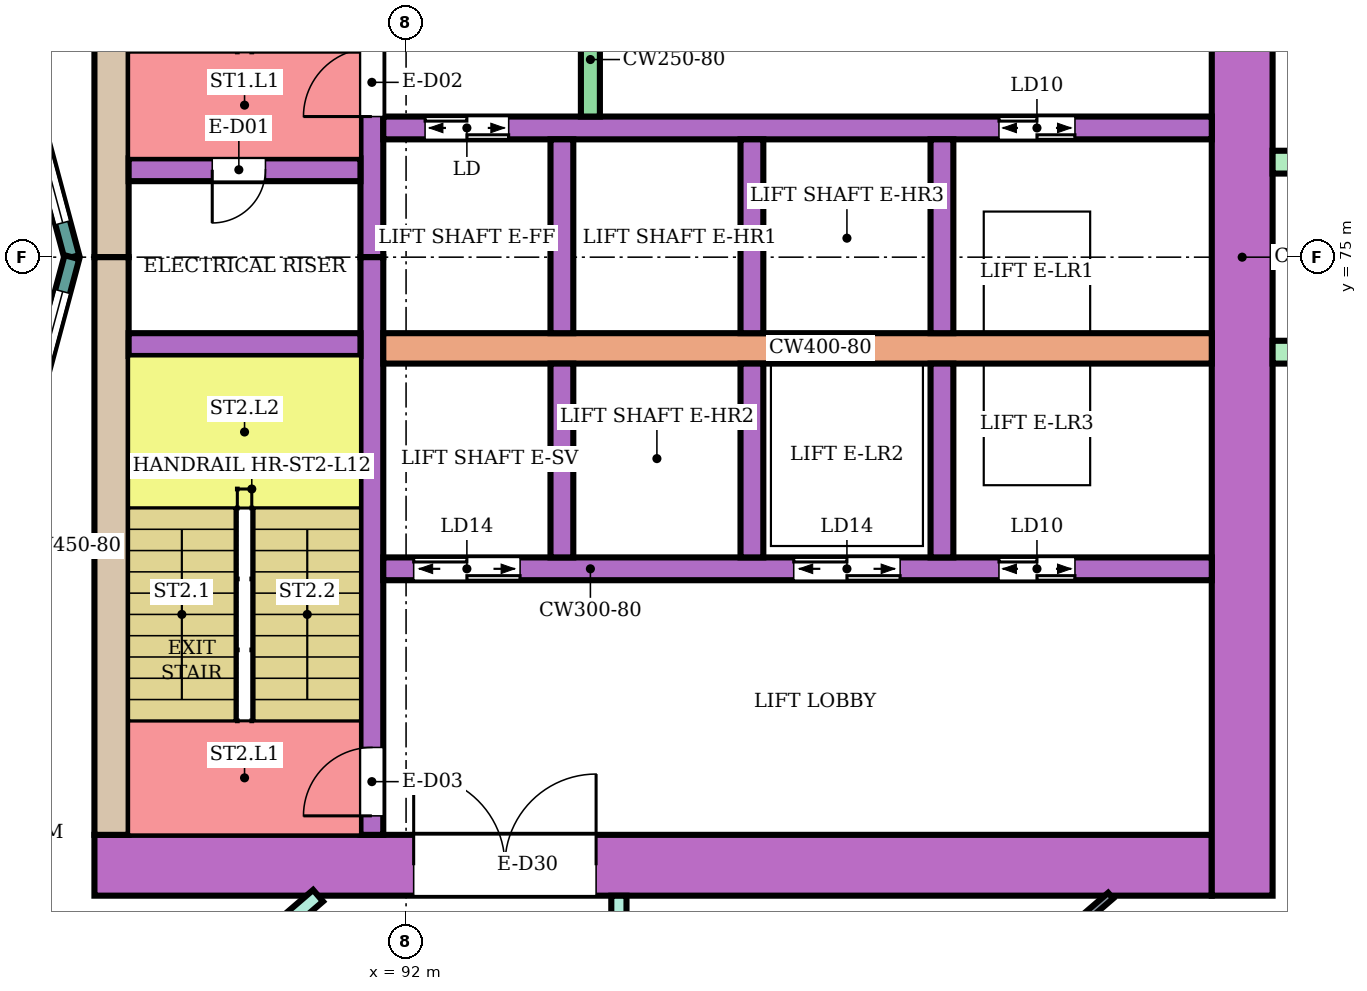
"""IFC4 building model, lengths in metres.
Left out: names, types, materials, properties, quantities, classifications, styles, units other than length and angle.
Written with IfcOpenShell. Run it as: python <this file> out.ifc"""

import sys

from ifc_helpers import new_model, si_unit, direction, frame, frame_2d, origin, place, context, subcontext, project, spatial, rectangle, extrude, element, fill, save


model = new_model("IFC4")
c1 = context("Model", 3, precision=1e-05, world=origin(), true_north=direction((0.0, 1.0)))
c2 = subcontext(c1, "Body", "Model", "MODEL_VIEW")
j1 = project(units=[si_unit("LENGTHUNIT", "METRE"), si_unit("PLANEANGLEUNIT", "RADIAN")], contexts=[c1])
p1 = place(None, origin())
s1 = spatial("IfcSite", under=j1, at=p1, CompositionType="ELEMENT")
p2 = place(p1, origin())
s2 = spatial("IfcBuilding", under=s1, at=p2, CompositionType="ELEMENT")
p3 = place(p2, frame((0.0, 0.0, 55.4)))
s3 = spatial("IfcBuildingStorey", under=s2, at=p3, CompositionType="ELEMENT", Elevation=55.4)
p4 = place(p3, frame((87.9, 67.0, 0.0), z_axis=(0.0, 0.0, 1.0), x_axis=(1.0, 0.0, 0.0)))
e1 = element("IfcWall", 1, at=p4, inside=s3, PredefinedType="SHEAR", context=c2, shape_type="SweptSolid", body=[
    extrude(rectangle(XDim=14.7, YDim=0.8, at=frame_2d((7.35, 0.0))), origin(), (0.0, 0.0, 1.0), 3.48),
])
p5 = place(p4, frame((4.2, 0.0, 0.0)))
e2 = element("IfcOpeningElement", 2, at=p5, cuts=e1, PredefinedType="OPENING", context=c2, shape_type="SweptSolid", body=[
    extrude(rectangle(XDim=2.4, YDim=2.4, at=frame_2d((1.2, 1.2))), frame((0.0, 0.41, 0.0), z_axis=(0.0, -1.0, 0.0), x_axis=(1.0, 0.0, 0.0)), (0.0, 0.0, 1.0), 0.82),
])
for number, where, z_axis, x_axis in (
    (3, (88.125, 75.0, 0.0), (0.0, 0.0, 1.0), (0.0, 1.0, 0.0)),
    (4, (88.125, 67.4, 0.0), (0.0, 0.0, 1.0), (0.0, 1.0, 0.0)),
):
    element("IfcWall", number, at=place(p3, frame(where, z_axis=z_axis, x_axis=x_axis)), inside=s3, PredefinedType="SHEAR", context=c2, shape_type="SweptSolid", body=[
        extrude(rectangle(XDim=7.6, YDim=0.45, at=frame_2d((3.8, 0.0))), origin(), (0.0, 0.0, 1.0), 3.48),
    ])
p6 = place(p3, frame((103.0, 66.6, 0.0), z_axis=(0.0, 0.0, 1.0), x_axis=(0.0, 1.0, 0.0)))
e5 = element("IfcWall", 5, at=p6, inside=s3, PredefinedType="SHEAR", context=c2, shape_type="SweptSolid", body=[
    extrude(rectangle(XDim=16.8, YDim=0.8, at=frame_2d((8.4, 0.0))), origin(), (0.0, 0.0, 1.0), 3.48),
])
p7 = place(p3, frame((91.55, 75.0, 0.0), z_axis=(0.0, 0.0, 1.0), x_axis=(0.0, 1.0, 0.0)))
e6 = element("IfcWall", 6, at=p7, inside=s3, PredefinedType="SHEAR", context=c2, shape_type="SweptSolid", body=[
    extrude(rectangle(XDim=7.6, YDim=0.3, at=frame_2d((3.8, 0.0))), origin(), (0.0, 0.0, 1.0), 3.48),
])
p8 = place(p7, frame((1.85, 0.0, 0.0)))
e7 = element("IfcOpeningElement", 7, at=p8, cuts=e6, PredefinedType="OPENING", context=c2, shape_type="SweptSolid", body=[
    extrude(rectangle(XDim=0.9, YDim=2.1, at=frame_2d((0.45, 1.05))), frame((0.0, 0.16, 0.0), z_axis=(0.0, -1.0, 0.0), x_axis=(1.0, 0.0, 0.0)), (0.0, 0.0, 1.0), 0.32),
])
p9 = place(p3, frame((91.55, 67.4, 0.0), z_axis=(0.0, 0.0, 1.0), x_axis=(0.0, 1.0, 0.0)))
e8 = element("IfcWall", 8, at=p9, inside=s3, PredefinedType="SHEAR", context=c2, shape_type="SweptSolid", body=[
    extrude(rectangle(XDim=7.6, YDim=0.3, at=frame_2d((3.8, 0.0))), origin(), (0.0, 0.0, 1.0), 3.48),
])
p10 = place(p9, frame((0.25, 0.0, 0.0)))
e9 = element("IfcOpeningElement", 9, at=p10, cuts=e8, PredefinedType="OPENING", context=c2, shape_type="SweptSolid", body=[
    extrude(rectangle(XDim=0.9, YDim=2.1, at=frame_2d((0.45, 1.05))), frame((0.0, 0.16, 0.0), z_axis=(0.0, -1.0, 0.0), x_axis=(1.0, 0.0, 0.0)), (0.0, 0.0, 1.0), 0.32),
])
p11 = place(p3, frame((88.35, 76.15, 0.0), z_axis=(0.0, 0.0, 1.0), x_axis=(1.0, 0.0, 0.0)))
e10 = element("IfcWall", 10, at=p11, inside=s3, PredefinedType="SHEAR", context=c2, shape_type="SweptSolid", body=[
    extrude(rectangle(XDim=3.05, YDim=0.3, at=frame_2d((1.525, 0.0))), origin(), (0.0, 0.0, 1.0), 3.48),
])
p12 = place(p11, frame((1.1, 0.0, 0.0)))
e11 = element("IfcOpeningElement", 11, at=p12, cuts=e10, PredefinedType="OPENING", context=c2, shape_type="SweptSolid", body=[
    extrude(rectangle(XDim=0.7, YDim=2.0, at=frame_2d((0.35, 1.0))), frame((0.0, 0.16, 0.0), z_axis=(0.0, -1.0, 0.0), x_axis=(1.0, 0.0, 0.0)), (0.0, 0.0, 1.0), 0.32),
])
p13 = place(p3, frame((88.35, 73.85, 0.0), z_axis=(0.0, 0.0, 1.0), x_axis=(1.0, 0.0, 0.0)))
e12 = element("IfcWall", 12, at=p13, inside=s3, PredefinedType="SHEAR", context=c2, shape_type="SweptSolid", body=[
    extrude(rectangle(XDim=3.05, YDim=0.3, at=frame_2d((1.525, 0.0))), origin(), (0.0, 0.0, 1.0), 3.48),
])
p14 = place(p3, frame((91.7, 76.7, 0.0), z_axis=(0.0, 0.0, 1.0), x_axis=(1.0, 0.0, 0.0)))
e13 = element("IfcWall", 13, at=p14, inside=s3, PredefinedType="SHEAR", context=c2, shape_type="SweptSolid", body=[
    extrude(rectangle(XDim=10.9, YDim=0.3, at=frame_2d((5.45, 0.0))), origin(), (0.0, 0.0, 1.0), 3.48),
])
p15 = place(p14, frame((0.55, 0.0, 0.0)))
e14 = element("IfcOpeningElement", 14, at=p15, cuts=e13, PredefinedType="OPENING", context=c2, shape_type="SweptSolid", body=[
    extrude(rectangle(XDim=1.1, YDim=2.1, at=frame_2d((0.55, 1.05))), frame((0.0, 0.16, 0.0), z_axis=(0.0, -1.0, 0.0), x_axis=(1.0, 0.0, 0.0)), (0.0, 0.0, 1.0), 0.32),
])
p16 = place(p14, frame((8.1, 0.0, 0.0)))
e15 = element("IfcOpeningElement", 15, at=p16, cuts=e13, PredefinedType="OPENING", context=c2, shape_type="SweptSolid", body=[
    extrude(rectangle(XDim=1.0, YDim=2.1, at=frame_2d((0.5, 1.05))), frame((0.0, 0.16, 0.0), z_axis=(0.0, -1.0, 0.0), x_axis=(1.0, 0.0, 0.0)), (0.0, 0.0, 1.0), 0.32),
])
p17 = place(p3, frame((91.7, 73.8, 0.0), z_axis=(0.0, 0.0, 1.0), x_axis=(1.0, 0.0, 0.0)))
e16 = element("IfcWall", 16, at=p17, inside=s3, PredefinedType="SHEAR", context=c2, shape_type="SweptSolid", body=[
    extrude(rectangle(XDim=10.9, YDim=0.4, at=frame_2d((5.45, 0.0))), origin(), (0.0, 0.0, 1.0), 3.48),
])
p18 = place(p3, frame((91.7, 70.9, 0.0), z_axis=(0.0, 0.0, 1.0), x_axis=(1.0, 0.0, 0.0)))
e17 = element("IfcWall", 17, at=p18, inside=s3, PredefinedType="SHEAR", context=c2, shape_type="SweptSolid", body=[
    extrude(rectangle(XDim=10.9, YDim=0.3, at=frame_2d((5.45, 0.0))), origin(), (0.0, 0.0, 1.0), 3.48),
])
p19 = place(p18, frame((0.4, 0.0, 0.0)))
e18 = element("IfcOpeningElement", 18, at=p19, cuts=e17, PredefinedType="OPENING", context=c2, shape_type="SweptSolid", body=[
    extrude(rectangle(XDim=1.4, YDim=2.1, at=frame_2d((0.7, 1.05))), frame((0.0, 0.16, 0.0), z_axis=(0.0, -1.0, 0.0), x_axis=(1.0, 0.0, 0.0)), (0.0, 0.0, 1.0), 0.32),
])
p20 = place(p18, frame((5.4, 0.0, 0.0)))
e19 = element("IfcOpeningElement", 19, at=p20, cuts=e17, PredefinedType="OPENING", context=c2, shape_type="SweptSolid", body=[
    extrude(rectangle(XDim=1.4, YDim=2.1, at=frame_2d((0.7, 1.05))), frame((0.0, 0.16, 0.0), z_axis=(0.0, -1.0, 0.0), x_axis=(1.0, 0.0, 0.0)), (0.0, 0.0, 1.0), 0.32),
])
p21 = place(p18, frame((8.1, 0.0, 0.0)))
e20 = element("IfcOpeningElement", 20, at=p21, cuts=e17, PredefinedType="OPENING", context=c2, shape_type="SweptSolid", body=[
    extrude(rectangle(XDim=1.0, YDim=2.1, at=frame_2d((0.5, 1.05))), frame((0.0, 0.16, 0.0), z_axis=(0.0, -1.0, 0.0), x_axis=(1.0, 0.0, 0.0)), (0.0, 0.0, 1.0), 0.32),
])
for number, where, z_axis, x_axis in (
    (21, (94.05, 74.0, 0.0), (0.0, 0.0, 1.0), (0.0, 1.0, 0.0)),
    (22, (96.55, 74.0, 0.0), (0.0, 0.0, 1.0), (0.0, 1.0, 0.0)),
    (23, (99.05, 74.0, 0.0), (0.0, 0.0, 1.0), (0.0, 1.0, 0.0)),
    (24, (94.05, 71.05, 0.0), (0.0, 0.0, 1.0), (0.0, 1.0, 0.0)),
    (25, (96.55, 71.05, 0.0), (0.0, 0.0, 1.0), (0.0, 1.0, 0.0)),
    (26, (99.05, 71.05, 0.0), (0.0, 0.0, 1.0), (0.0, 1.0, 0.0)),
):
    element("IfcWall", number, at=place(p3, frame(where, z_axis=z_axis, x_axis=x_axis)), inside=s3, PredefinedType="SHEAR", context=c2, shape_type="SweptSolid", body=[
        extrude(rectangle(XDim=2.55, YDim=0.3, at=frame_2d((1.275, 0.0))), origin(), (0.0, 0.0, 1.0), 3.48),
    ])
p22 = place(p3, frame((94.425, 76.85, 0.0), z_axis=(0.0, 0.0, 1.0), x_axis=(0.0, 1.0, 0.0)))
e27 = element("IfcWall", 27, at=p22, inside=s3, PredefinedType="SHEAR", context=c2, shape_type="SweptSolid", body=[
    extrude(rectangle(XDim=1.5, YDim=0.25, at=frame_2d((0.75, 0.0))), origin(), (0.0, 0.0, 1.0), 3.48),
])
for number, where, z_axis, x_axis in (
    (28, (103.4, 73.75, 0.0), (0.0, 0.0, 1.0), (1.0, 0.0, 0.0)),
    (29, (103.4, 76.25, 0.0), (0.0, 0.0, 1.0), (1.0, 0.0, 0.0)),
):
    element("IfcWall", number, at=place(p3, frame(where, z_axis=z_axis, x_axis=x_axis)), inside=s3, PredefinedType="NOTDEFINED", context=c2, shape_type="SweptSolid", body=[
        extrude(rectangle(XDim=2.416, YDim=0.3, at=frame_2d((1.208, 0.0))), origin(), (0.0, 0.0, 1.0), 3.8),
    ])
p23 = place(p3, frame((87.604, 75.0, 0.0), z_axis=(0.0, 0.0, 1.0), x_axis=(-0.258789828301, 0.965933654434, 0.0)))
e30 = element("IfcWall", 30, at=p23, inside=s3, PredefinedType="NOTDEFINED", context=c2, shape_type="SweptSolid", body=[
    extrude(rectangle(XDim=3.936, YDim=0.2, at=frame_2d((1.968, 0.0))), origin(), (0.0, 0.0, 1.0), 3.8),
])
p24 = place(p23, frame((0.468, 0.0, 0.9)))
e31 = element("IfcOpeningElement", 31, at=p24, cuts=e30, PredefinedType="OPENING", context=c2, shape_type="SweptSolid", body=[
    extrude(rectangle(XDim=3.0, YDim=2.3, at=frame_2d((1.5, 1.15))), frame((0.0, 0.11, 0.0), z_axis=(0.0, -1.0, 0.0), x_axis=(1.0, 0.0, 0.0)), (0.0, 0.0, 1.0), 0.22),
])
p25 = place(p3, frame((86.585, 71.198, 0.0), z_axis=(0.0, 0.0, 1.0), x_axis=(0.258789828301, 0.965933654434, 0.0)))
e32 = element("IfcWall", 32, at=p25, inside=s3, PredefinedType="NOTDEFINED", context=c2, shape_type="SweptSolid", body=[
    extrude(rectangle(XDim=3.936, YDim=0.2, at=frame_2d((1.968, 0.0))), origin(), (0.0, 0.0, 1.0), 3.8),
])
p26 = place(p25, frame((0.468, 0.0, 0.9)))
e33 = element("IfcOpeningElement", 33, at=p26, cuts=e32, PredefinedType="OPENING", context=c2, shape_type="SweptSolid", body=[
    extrude(rectangle(XDim=3.0, YDim=2.3, at=frame_2d((1.5, 1.15))), frame((0.0, 0.11, 0.0), z_axis=(0.0, -1.0, 0.0), x_axis=(1.0, 0.0, 0.0)), (0.0, 0.0, 1.0), 0.22),
])
p27 = place(p3, frame((86.877, 63.189, 0.0), z_axis=(0.0, 0.0, 1.0), x_axis=(0.758164888471, 0.652062881853, 0.0)))
e34 = element("IfcWall", 34, at=p27, inside=s3, PredefinedType="PARTITIONING", context=c2, shape_type="SweptSolid", body=[
    extrude(rectangle(XDim=5.23, YDim=0.2, at=frame_2d((2.615, 0.0))), origin(), (0.0, 0.0, 1.0), 3.35),
])
p28 = place(p27, frame((2.63, 0.0, 0.0)))
e35 = element("IfcOpeningElement", 35, at=p28, cuts=e34, PredefinedType="OPENING", context=c2, shape_type="SweptSolid", body=[
    extrude(rectangle(XDim=1.0, YDim=2.1, at=frame_2d((0.5, 1.05))), frame((0.0, 0.11, 0.0), z_axis=(0.0, -1.0, 0.0), x_axis=(1.0, 0.0, 0.0)), (0.0, 0.0, 1.0), 0.22),
])
p29 = place(p3, frame((94.8, 65.1, 0.0), z_axis=(0.0, 0.0, 1.0), x_axis=(0.0, 1.0, 0.0)))
e36 = element("IfcWall", 36, at=p29, inside=s3, PredefinedType="PARTITIONING", context=c2, shape_type="SweptSolid", body=[
    extrude(rectangle(XDim=1.499, YDim=0.2, at=frame_2d((0.75, 0.0))), origin(), (0.0, 0.0, 1.0), 3.35),
])
p30 = place(p3, frame((86.643, 66.681, 0.0), z_axis=(0.0, 0.0, 1.0), x_axis=(0.652264876065, -0.757991115682, 0.0)))
e37 = element("IfcWall", 37, at=p30, inside=s3, PredefinedType="PARTITIONING", context=c2, shape_type="SweptSolid", body=[
    extrude(rectangle(XDim=2.699, YDim=0.1, at=frame_2d((1.35, 0.0))), origin(), (0.0, 0.0, 1.0), 3.35),
])
p31 = place(p30, frame((1.3, 0.0, 0.0)))
e38 = element("IfcOpeningElement", 38, at=p31, cuts=e37, PredefinedType="OPENING", context=c2, shape_type="SweptSolid", body=[
    extrude(rectangle(XDim=0.8, YDim=2.1, at=frame_2d((0.4, 1.05))), frame((0.0, 0.06, 0.0), z_axis=(0.0, -1.0, 0.0), x_axis=(1.0, 0.0, 0.0)), (0.0, 0.0, 1.0), 0.12),
])
p32 = place(p3, frame((94.428, 60.715, 0.0), z_axis=(0.0, 0.0, 1.0), x_axis=(0.758117248367, 0.65211826974, 0.0)))
e39 = element("IfcWall", 39, at=p32, inside=s3, PredefinedType="PARTITIONING", context=c2, shape_type="SweptSolid", body=[
    extrude(rectangle(XDim=9.024, YDim=0.1, at=frame_2d((4.512, 0.0))), origin(), (0.0, 0.0, 1.0), 3.35),
])
p33 = place(p32, frame((5.002, 0.0, 0.0)))
e40 = element("IfcOpeningElement", 40, at=p33, cuts=e39, PredefinedType="OPENING", context=c2, shape_type="SweptSolid", body=[
    extrude(rectangle(XDim=0.9, YDim=2.1, at=frame_2d((0.45, 1.05))), frame((0.0, 0.06, 0.0), z_axis=(0.0, -1.0, 0.0), x_axis=(1.0, 0.0, 0.0)), (0.0, 0.0, 1.0), 0.12),
])
p34 = place(p24, origin())
e41 = element("IfcWindow", 41, at=p34, inside=s3, PartitioningType="SINGLE_PANEL", PredefinedType="WINDOW", context=c2, shape_type="SweptSolid", body=[
    extrude(rectangle(XDim=3.0, YDim=2.3, at=frame_2d((1.5, 1.15))), frame((0.0, 0.03, 0.0), z_axis=(0.0, -1.0, 0.0), x_axis=(1.0, 0.0, 0.0)), (0.0, 0.0, 1.0), 0.06),
])
fill(e31, e41)
p35 = place(p26, origin())
e42 = element("IfcWindow", 42, at=p35, inside=s3, PartitioningType="SINGLE_PANEL", PredefinedType="WINDOW", context=c2, shape_type="SweptSolid", body=[
    extrude(rectangle(XDim=3.0, YDim=2.3, at=frame_2d((1.5, 1.15))), frame((0.0, 0.03, 0.0), z_axis=(0.0, -1.0, 0.0), x_axis=(1.0, 0.0, 0.0)), (0.0, 0.0, 1.0), 0.06),
])
fill(e33, e42)
p36 = place(p12, frame((0.7, 0.0, 0.0), z_axis=(0.0, 0.0, 1.0), x_axis=(-1.0, 0.0, 0.0)))
e43 = element("IfcDoor", 43, at=p36, inside=s3, OperationType="SINGLE_SWING_RIGHT", PredefinedType="DOOR", context=c2, shape_type="SweptSolid", body=[
    extrude(rectangle(XDim=0.7, YDim=2.0, at=frame_2d((0.35, 1.0))), frame((0.0, 0.025, 0.0), z_axis=(0.0, -1.0, 0.0), x_axis=(1.0, 0.0, 0.0)), (0.0, 0.0, 1.0), 0.05),
])
fill(e11, e43)
p37 = place(p8, origin())
e44 = element("IfcDoor", 44, at=p37, inside=s3, OperationType="SINGLE_SWING_LEFT", PredefinedType="DOOR", context=c2, shape_type="SweptSolid", body=[
    extrude(rectangle(XDim=0.9, YDim=2.1, at=frame_2d((0.45, 1.05))), frame((0.0, 0.025, 0.0), z_axis=(0.0, -1.0, 0.0), x_axis=(1.0, 0.0, 0.0)), (0.0, 0.0, 1.0), 0.05),
])
fill(e7, e44)
p38 = place(p10, origin())
e45 = element("IfcDoor", 45, at=p38, inside=s3, OperationType="SINGLE_SWING_LEFT", PredefinedType="DOOR", context=c2, shape_type="SweptSolid", body=[
    extrude(rectangle(XDim=0.9, YDim=2.1, at=frame_2d((0.45, 1.05))), frame((0.0, 0.025, 0.0), z_axis=(0.0, -1.0, 0.0), x_axis=(1.0, 0.0, 0.0)), (0.0, 0.0, 1.0), 0.05),
])
fill(e9, e45)
p39 = place(p15, origin())
e46 = element("IfcDoor", 46, at=p39, inside=s3, OperationType="DOUBLE_DOOR_SLIDING", PredefinedType="DOOR", context=c2, shape_type="SweptSolid", body=[
    extrude(rectangle(XDim=1.1, YDim=2.1, at=frame_2d((0.55, 1.05))), frame((0.0, 0.025, 0.0), z_axis=(0.0, -1.0, 0.0), x_axis=(1.0, 0.0, 0.0)), (0.0, 0.0, 1.0), 0.05),
])
fill(e14, e46)
p40 = place(p16, origin())
e47 = element("IfcDoor", 47, at=p40, inside=s3, OperationType="DOUBLE_DOOR_SLIDING", PredefinedType="DOOR", context=c2, shape_type="SweptSolid", body=[
    extrude(rectangle(XDim=1.0, YDim=2.1, at=frame_2d((0.5, 1.05))), frame((0.0, 0.025, 0.0), z_axis=(0.0, -1.0, 0.0), x_axis=(1.0, 0.0, 0.0)), (0.0, 0.0, 1.0), 0.05),
])
fill(e15, e47)
p41 = place(p19, origin())
e48 = element("IfcDoor", 48, at=p41, inside=s3, OperationType="DOUBLE_DOOR_SLIDING", PredefinedType="DOOR", context=c2, shape_type="SweptSolid", body=[
    extrude(rectangle(XDim=1.4, YDim=2.1, at=frame_2d((0.7, 1.05))), frame((0.0, 0.025, 0.0), z_axis=(0.0, -1.0, 0.0), x_axis=(1.0, 0.0, 0.0)), (0.0, 0.0, 1.0), 0.05),
])
fill(e18, e48)
p42 = place(p20, origin())
e49 = element("IfcDoor", 49, at=p42, inside=s3, OperationType="DOUBLE_DOOR_SLIDING", PredefinedType="DOOR", context=c2, shape_type="SweptSolid", body=[
    extrude(rectangle(XDim=1.4, YDim=2.1, at=frame_2d((0.7, 1.05))), frame((0.0, 0.025, 0.0), z_axis=(0.0, -1.0, 0.0), x_axis=(1.0, 0.0, 0.0)), (0.0, 0.0, 1.0), 0.05),
])
fill(e19, e49)
p43 = place(p21, origin())
e50 = element("IfcDoor", 50, at=p43, inside=s3, OperationType="DOUBLE_DOOR_SLIDING", PredefinedType="DOOR", context=c2, shape_type="SweptSolid", body=[
    extrude(rectangle(XDim=1.0, YDim=2.1, at=frame_2d((0.5, 1.05))), frame((0.0, 0.025, 0.0), z_axis=(0.0, -1.0, 0.0), x_axis=(1.0, 0.0, 0.0)), (0.0, 0.0, 1.0), 0.05),
])
fill(e20, e50)
p44 = place(p5, origin())
e51 = element("IfcDoor", 51, at=p44, inside=s3, OperationType="DOUBLE_DOOR_SINGLE_SWING", PredefinedType="DOOR", context=c2, shape_type="SweptSolid", body=[
    extrude(rectangle(XDim=2.4, YDim=2.4, at=frame_2d((1.2, 1.2))), frame((0.0, 0.025, 0.0), z_axis=(0.0, -1.0, 0.0), x_axis=(1.0, 0.0, 0.0)), (0.0, 0.0, 1.0), 0.05),
])
fill(e2, e51)
save(model, sys.argv[1])
